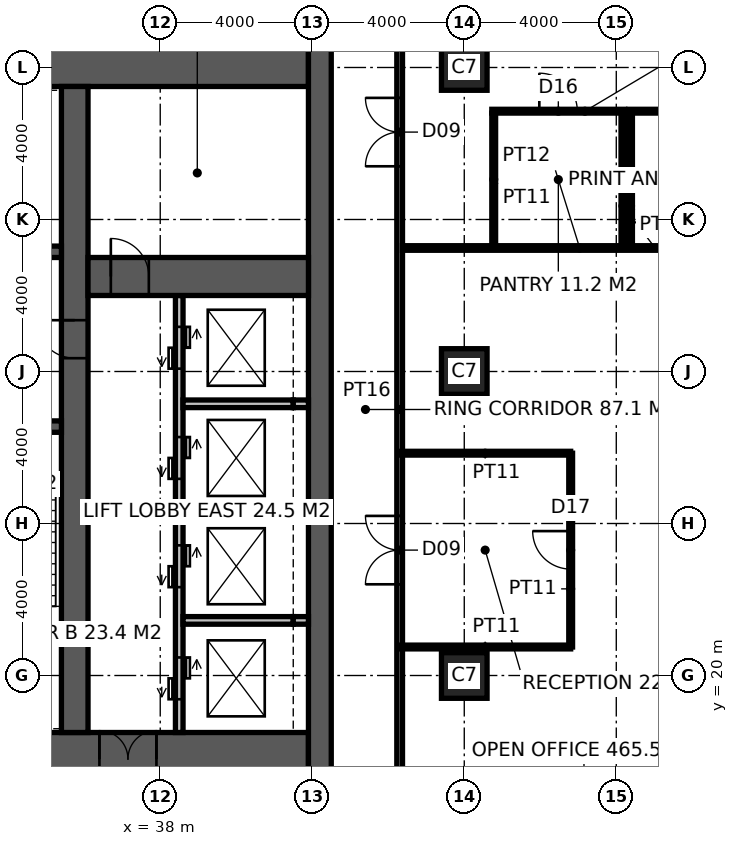
"""IFC4 building model, lengths in metres.
Left out: names, types, materials, properties, quantities, classifications, styles, units other than length and angle.
Written with IfcOpenShell. Run it as: python <this file> out.ifc"""

import sys

from ifc_helpers import new_model, si_unit, direction, frame, frame_2d, origin, origin_2d, place, context, subcontext, project, spatial, rectangle, hollow_rectangle, extrude, element, fill, save


model = new_model("IFC4")
c1 = context("Model", 3, precision=1e-05, world=origin(), true_north=direction((0.0, 1.0)))
c2 = subcontext(c1, "Body", "Model", "MODEL_VIEW")
j1 = project(units=[si_unit("LENGTHUNIT", "METRE"), si_unit("PLANEANGLEUNIT", "RADIAN")], contexts=[c1])
p1 = place(None, origin())
s1 = spatial("IfcSite", under=j1, at=p1, CompositionType="ELEMENT")
p2 = place(p1, origin())
s2 = spatial("IfcBuilding", under=s1, at=p2, CompositionType="ELEMENT")
p3 = place(p2, frame((0.0, 0.0, 51.0)))
s3 = spatial("IfcBuildingStorey", under=s2, at=p3, CompositionType="ELEMENT", Elevation=51.0)
for number, where, z_axis, x_axis in (
    (1, (46.0, 20.0, 0.0), (0.0, 0.0, 1.0), (1.0, 0.0, 0.0)),
    (2, (46.0, 28.0, 0.0), (0.0, 0.0, 1.0), (1.0, 0.0, 0.0)),
    (3, (46.0, 36.0, 0.0), (0.0, 0.0, 1.0), (1.0, 0.0, 0.0)),
):
    element("IfcColumn", number, at=place(p3, frame(where, z_axis=z_axis, x_axis=x_axis)), inside=s3, PredefinedType="COLUMN", context=c2, shape_type="SweptSolid", body=[
        extrude(hollow_rectangle(XDim=1.2, YDim=1.2, WallThickness=0.1, at=origin_2d()), origin(), (0.0, 0.0, 1.0), 4.0),
    ])
p4 = place(p3, frame((18.5, 17.8, -0.15), z_axis=(0.0, 0.0, 1.0), x_axis=(1.0, 0.0, 0.0)))
e4 = element("IfcWall", 4, at=p4, inside=s3, PredefinedType="SHEAR", context=c2, shape_type="SweptSolid", body=[
    extrude(rectangle(XDim=23.4, YDim=1.4, at=frame_2d((11.7, 0.0))), origin(), (0.0, 0.0, 1.0), 4.0),
])
p5 = place(p4, frame((3.45, 0.0, 0.15)))
e5 = element("IfcOpeningElement", 5, at=p5, cuts=e4, PredefinedType="OPENING", context=c2, shape_type="SweptSolid", body=[
    extrude(rectangle(XDim=1.5, YDim=2.4, at=frame_2d((0.75, 1.2))), frame((0.0, 0.71, 0.0), z_axis=(0.0, -1.0, 0.0), x_axis=(1.0, 0.0, 0.0)), (0.0, 0.0, 1.0), 1.42),
])
p6 = place(p4, frame((17.9, 0.0, 0.15)))
e6 = element("IfcOpeningElement", 6, at=p6, cuts=e4, PredefinedType="OPENING", context=c2, shape_type="SweptSolid", body=[
    extrude(rectangle(XDim=1.5, YDim=2.4, at=frame_2d((0.75, 1.2))), frame((0.0, 0.71, 0.0), z_axis=(0.0, -1.0, 0.0), x_axis=(1.0, 0.0, 0.0)), (0.0, 0.0, 1.0), 1.42),
])
p7 = place(p4, frame((0.9, 0.0, 0.15)))
e7 = element("IfcOpeningElement", 7, at=p7, cuts=e4, PredefinedType="OPENING", context=c2, shape_type="SweptSolid", body=[
    extrude(rectangle(XDim=1.0, YDim=2.2, at=frame_2d((0.5, 1.1))), frame((0.0, 0.71, 0.0), z_axis=(0.0, -1.0, 0.0), x_axis=(1.0, 0.0, 0.0)), (0.0, 0.0, 1.0), 1.42),
])
p8 = place(p3, frame((18.5, 36.2, -0.15), z_axis=(0.0, 0.0, 1.0), x_axis=(1.0, 0.0, 0.0)))
e8 = element("IfcWall", 8, at=p8, inside=s3, PredefinedType="SHEAR", context=c2, shape_type="SweptSolid", body=[
    extrude(rectangle(XDim=23.4, YDim=1.4, at=frame_2d((11.7, 0.0))), origin(), (0.0, 0.0, 1.0), 4.0),
])
p9 = place(p3, frame((42.2, 17.1, -0.15), z_axis=(0.0, 0.0, 1.0), x_axis=(0.0, 1.0, 0.0)))
e9 = element("IfcWall", 9, at=p9, inside=s3, PredefinedType="SHEAR", context=c2, shape_type="SweptSolid", body=[
    extrude(rectangle(XDim=19.8, YDim=0.6, at=frame_2d((9.9, 0.0))), origin(), (0.0, 0.0, 1.0), 4.0),
])
p10 = place(p3, frame((35.75, 18.5, -0.15), z_axis=(0.0, 0.0, 1.0), x_axis=(0.0, 1.0, 0.0)))
e10 = element("IfcWall", 10, at=p10, inside=s3, PredefinedType="SHEAR", context=c2, shape_type="SweptSolid", body=[
    extrude(rectangle(XDim=17.0, YDim=0.7, at=frame_2d((8.5, 0.0))), origin(), (0.0, 0.0, 1.0), 4.0),
])
p11 = place(p10, frame((9.85, 0.0, 0.15)))
e11 = element("IfcOpeningElement", 11, at=p11, cuts=e10, PredefinedType="OPENING", context=c2, shape_type="SweptSolid", body=[
    extrude(rectangle(XDim=1.0, YDim=2.2, at=frame_2d((0.5, 1.1))), frame((0.0, 0.36, 0.0), z_axis=(0.0, -1.0, 0.0), x_axis=(1.0, 0.0, 0.0)), (0.0, 0.0, 1.0), 0.72),
])
p12 = place(p3, frame((24.15, 26.55, -0.15), z_axis=(0.0, 0.0, 1.0), x_axis=(1.0, 0.0, 0.0)))
e12 = element("IfcWall", 12, at=p12, inside=s3, PredefinedType="SHEAR", context=c2, shape_type="SweptSolid", body=[
    extrude(rectangle(XDim=11.25, YDim=0.3, at=frame_2d((5.625, 0.0))), origin(), (0.0, 0.0, 1.0), 4.0),
])
p13 = place(p12, frame((9.25, 0.0, 0.15)))
e13 = element("IfcOpeningElement", 13, at=p13, cuts=e12, PredefinedType="OPENING", context=c2, shape_type="SweptSolid", body=[
    extrude(rectangle(XDim=1.0, YDim=2.2, at=frame_2d((0.5, 1.1))), frame((0.0, 0.16, 0.0), z_axis=(0.0, -1.0, 0.0), x_axis=(1.0, 0.0, 0.0)), (0.0, 0.0, 1.0), 0.32),
])
p14 = place(p12, frame((4.9, 0.0, 0.15)))
e14 = element("IfcOpeningElement", 14, at=p14, cuts=e12, PredefinedType="OPENING", context=c2, shape_type="SweptSolid", body=[
    extrude(rectangle(XDim=1.5, YDim=2.4, at=frame_2d((0.75, 1.2))), frame((0.0, 0.16, 0.0), z_axis=(0.0, -1.0, 0.0), x_axis=(1.0, 0.0, 0.0)), (0.0, 0.0, 1.0), 0.32),
])
p15 = place(p3, frame((24.15, 31.15, -0.15), z_axis=(0.0, 0.0, 1.0), x_axis=(1.0, 0.0, 0.0)))
e15 = element("IfcWall", 15, at=p15, inside=s3, PredefinedType="SHEAR", context=c2, shape_type="SweptSolid", body=[
    extrude(rectangle(XDim=11.25, YDim=0.3, at=frame_2d((5.625, 0.0))), origin(), (0.0, 0.0, 1.0), 4.0),
])
p16 = place(p15, frame((7.25, 0.0, 0.15)))
e16 = element("IfcOpeningElement", 16, at=p16, cuts=e15, PredefinedType="OPENING", context=c2, shape_type="SweptSolid", body=[
    extrude(rectangle(XDim=1.4, YDim=2.4, at=frame_2d((0.7, 1.2))), frame((0.0, 0.16, 0.0), z_axis=(0.0, -1.0, 0.0), x_axis=(1.0, 0.0, 0.0)), (0.0, 0.0, 1.0), 0.32),
])
p17 = place(p3, frame((38.5, 18.5, -0.15), z_axis=(0.0, 0.0, 1.0), x_axis=(0.0, 1.0, 0.0)))
e17 = element("IfcWall", 17, at=p17, inside=s3, PredefinedType="SOLIDWALL", context=c2, shape_type="SweptSolid", body=[
    extrude(rectangle(XDim=11.5, YDim=0.2, at=frame_2d((5.75, 0.0))), origin(), (0.0, 0.0, 1.0), 4.0),
])
p18 = place(p17, frame((0.875, 0.0, 0.15)))
e18 = element("IfcOpeningElement", 18, at=p18, cuts=e17, PredefinedType="OPENING", context=c2, shape_type="SweptSolid", body=[
    extrude(rectangle(XDim=1.1, YDim=2.2, at=frame_2d((0.55, 1.1))), frame((0.0, 0.11, 0.0), z_axis=(0.0, -1.0, 0.0), x_axis=(1.0, 0.0, 0.0)), (0.0, 0.0, 1.0), 0.22),
])
p19 = place(p17, frame((3.825, 0.0, 0.15)))
e19 = element("IfcOpeningElement", 19, at=p19, cuts=e17, PredefinedType="OPENING", context=c2, shape_type="SweptSolid", body=[
    extrude(rectangle(XDim=1.1, YDim=2.2, at=frame_2d((0.55, 1.1))), frame((0.0, 0.11, 0.0), z_axis=(0.0, -1.0, 0.0), x_axis=(1.0, 0.0, 0.0)), (0.0, 0.0, 1.0), 0.22),
])
p20 = place(p17, frame((6.675, 0.0, 0.15)))
e20 = element("IfcOpeningElement", 20, at=p20, cuts=e17, PredefinedType="OPENING", context=c2, shape_type="SweptSolid", body=[
    extrude(rectangle(XDim=1.1, YDim=2.2, at=frame_2d((0.55, 1.1))), frame((0.0, 0.11, 0.0), z_axis=(0.0, -1.0, 0.0), x_axis=(1.0, 0.0, 0.0)), (0.0, 0.0, 1.0), 0.22),
])
p21 = place(p17, frame((9.575, 0.0, 0.15)))
e21 = element("IfcOpeningElement", 21, at=p21, cuts=e17, PredefinedType="OPENING", context=c2, shape_type="SweptSolid", body=[
    extrude(rectangle(XDim=1.1, YDim=2.2, at=frame_2d((0.55, 1.1))), frame((0.0, 0.11, 0.0), z_axis=(0.0, -1.0, 0.0), x_axis=(1.0, 0.0, 0.0)), (0.0, 0.0, 1.0), 0.22),
])
p22 = place(p3, frame((36.1, 30.5, -0.15), z_axis=(0.0, 0.0, 1.0), x_axis=(1.0, 0.0, 0.0)))
e22 = element("IfcWall", 22, at=p22, inside=s3, PredefinedType="SHEAR", context=c2, shape_type="SweptSolid", body=[
    extrude(rectangle(XDim=5.8, YDim=1.0, at=frame_2d((2.9, 0.0))), origin(), (0.0, 0.0, 1.0), 4.0),
])
p23 = place(p22, frame((0.6, 0.0, 0.15)))
e23 = element("IfcOpeningElement", 23, at=p23, cuts=e22, PredefinedType="OPENING", context=c2, shape_type="SweptSolid", body=[
    extrude(rectangle(XDim=1.0, YDim=2.2, at=frame_2d((0.5, 1.1))), frame((0.0, 0.51, 0.0), z_axis=(0.0, -1.0, 0.0), x_axis=(1.0, 0.0, 0.0)), (0.0, 0.0, 1.0), 1.02),
])
p24 = place(p3, frame((38.6, 21.45, -0.15), z_axis=(0.0, 0.0, 1.0), x_axis=(1.0, 0.0, 0.0)))
e24 = element("IfcWall", 24, at=p24, inside=s3, PredefinedType="SOLIDWALL", context=c2, shape_type="SweptSolid", body=[
    extrude(rectangle(XDim=2.9, YDim=0.2, at=frame_2d((1.45, 0.0))), origin(), (0.0, 0.0, 1.0), 4.0),
])
p25 = place(p3, frame((41.5, 21.45, -0.15), z_axis=(0.0, 0.0, 1.0), x_axis=(1.0, 0.0, 0.0)))
e25 = element("IfcWall", 25, at=p25, inside=s3, PredefinedType="SOLIDWALL", context=c2, shape_type="SweptSolid", body=[
    extrude(rectangle(XDim=0.4, YDim=0.2, at=frame_2d((0.2, 0.0))), origin(), (0.0, 0.0, 1.0), 4.0),
])
p26 = place(p3, frame((38.6, 24.3, -0.15), z_axis=(0.0, 0.0, 1.0), x_axis=(1.0, 0.0, 0.0)))
e26 = element("IfcWall", 26, at=p26, inside=s3, PredefinedType="SOLIDWALL", context=c2, shape_type="SweptSolid", body=[
    extrude(rectangle(XDim=2.9, YDim=0.2, at=frame_2d((1.45, 0.0))), origin(), (0.0, 0.0, 1.0), 4.0),
])
p27 = place(p3, frame((41.5, 24.3, -0.15), z_axis=(0.0, 0.0, 1.0), x_axis=(1.0, 0.0, 0.0)))
e27 = element("IfcWall", 27, at=p27, inside=s3, PredefinedType="SOLIDWALL", context=c2, shape_type="SweptSolid", body=[
    extrude(rectangle(XDim=0.4, YDim=0.2, at=frame_2d((0.2, 0.0))), origin(), (0.0, 0.0, 1.0), 4.0),
])
p28 = place(p3, frame((38.6, 27.15, -0.15), z_axis=(0.0, 0.0, 1.0), x_axis=(1.0, 0.0, 0.0)))
e28 = element("IfcWall", 28, at=p28, inside=s3, PredefinedType="SOLIDWALL", context=c2, shape_type="SweptSolid", body=[
    extrude(rectangle(XDim=2.9, YDim=0.2, at=frame_2d((1.45, 0.0))), origin(), (0.0, 0.0, 1.0), 4.0),
])
p29 = place(p3, frame((41.5, 27.15, -0.15), z_axis=(0.0, 0.0, 1.0), x_axis=(1.0, 0.0, 0.0)))
e29 = element("IfcWall", 29, at=p29, inside=s3, PredefinedType="SOLIDWALL", context=c2, shape_type="SweptSolid", body=[
    extrude(rectangle(XDim=0.4, YDim=0.2, at=frame_2d((0.2, 0.0))), origin(), (0.0, 0.0, 1.0), 4.0),
])
p30 = place(p3, frame((44.3, 15.225, 0.0), z_axis=(0.0, 0.0, 1.0), x_axis=(0.0, 1.0, 0.0)))
e30 = element("IfcWall", 30, at=p30, inside=s3, PredefinedType="PARTITIONING", context=c2, shape_type="SweptSolid", body=[
    extrude(rectangle(XDim=23.55, YDim=0.15, at=frame_2d((11.775, 0.0))), origin(), (0.0, 0.0, 1.0), 3.85),
])
p31 = place(p30, frame((7.175, 0.0, 0.0)))
e31 = element("IfcOpeningElement", 31, at=p31, cuts=e30, PredefinedType="OPENING", context=c2, shape_type="SweptSolid", body=[
    extrude(rectangle(XDim=1.8, YDim=2.4, at=frame_2d((0.9, 1.2))), frame((0.0, 0.085, 0.0), z_axis=(0.0, -1.0, 0.0), x_axis=(1.0, 0.0, 0.0)), (0.0, 0.0, 1.0), 0.17),
])
p32 = place(p30, frame((18.175, 0.0, 0.0)))
e32 = element("IfcOpeningElement", 32, at=p32, cuts=e30, PredefinedType="OPENING", context=c2, shape_type="SweptSolid", body=[
    extrude(rectangle(XDim=1.8, YDim=2.4, at=frame_2d((0.9, 1.2))), frame((0.0, 0.085, 0.0), z_axis=(0.0, -1.0, 0.0), x_axis=(1.0, 0.0, 0.0)), (0.0, 0.0, 1.0), 0.17),
])
p33 = place(p3, frame((44.375, 31.25, 0.0), z_axis=(0.0, 0.0, 1.0), x_axis=(1.0, 0.0, 0.0)))
e33 = element("IfcWall", 33, at=p33, inside=s3, PredefinedType="PARTITIONING", context=c2, shape_type="SweptSolid", body=[
    extrude(rectangle(XDim=9.325, YDim=0.12, at=frame_2d((4.663, 0.0))), origin(), (0.0, 0.0, 1.0), 3.85),
])
p34 = place(p3, frame((46.725, 34.85, 0.0), z_axis=(0.0, 0.0, 1.0), x_axis=(1.0, 0.0, 0.0)))
e34 = element("IfcWall", 34, at=p34, inside=s3, PredefinedType="PARTITIONING", context=c2, shape_type="SweptSolid", body=[
    extrude(rectangle(XDim=3.5, YDim=0.1, at=frame_2d((1.75, 0.0))), origin(), (0.0, 0.0, 1.0), 3.85),
])
p35 = place(p34, frame((1.25, 0.0, 0.0)))
e35 = element("IfcOpeningElement", 35, at=p35, cuts=e34, PredefinedType="OPENING", context=c2, shape_type="SweptSolid", body=[
    extrude(rectangle(XDim=1.0, YDim=2.2, at=frame_2d((0.5, 1.1))), frame((0.0, 0.06, 0.0), z_axis=(0.0, -1.0, 0.0), x_axis=(1.0, 0.0, 0.0)), (0.0, 0.0, 1.0), 0.12),
])
p36 = place(p3, frame((50.325, 34.85, 0.0), z_axis=(0.0, 0.0, 1.0), x_axis=(1.0, 0.0, 0.0)))
e36 = element("IfcWall", 36, at=p36, inside=s3, PredefinedType="PARTITIONING", context=c2, shape_type="SweptSolid", body=[
    extrude(rectangle(XDim=2.75, YDim=0.1, at=frame_2d((1.375, 0.0))), origin(), (0.0, 0.0, 1.0), 3.85),
])
p37 = place(p36, frame((0.875, 0.0, 0.0)))
e37 = element("IfcOpeningElement", 37, at=p37, cuts=e36, PredefinedType="OPENING", context=c2, shape_type="SweptSolid", body=[
    extrude(rectangle(XDim=1.0, YDim=2.2, at=frame_2d((0.5, 1.1))), frame((0.0, 0.06, 0.0), z_axis=(0.0, -1.0, 0.0), x_axis=(1.0, 0.0, 0.0)), (0.0, 0.0, 1.0), 0.12),
])
for number, where, z_axis, x_axis in (
    (38, (46.775, 31.31, 0.0), (0.0, 0.0, 1.0), (0.0, 1.0, 0.0)),
    (39, (50.175, 31.31, 0.0), (0.0, 0.0, 1.0), (0.0, 1.0, 0.0)),
    (40, (50.375, 31.31, 0.0), (0.0, 0.0, 1.0), (0.0, 1.0, 0.0)),
):
    element("IfcWall", number, at=place(p3, frame(where, z_axis=z_axis, x_axis=x_axis)), inside=s3, PredefinedType="PARTITIONING", context=c2, shape_type="SweptSolid", body=[
        extrude(rectangle(XDim=3.49, YDim=0.1, at=frame_2d((1.745, 0.0))), origin(), (0.0, 0.0, 1.0), 3.85),
    ])
p38 = place(p3, frame((44.3, 20.75, 0.0), z_axis=(0.0, 0.0, 1.0), x_axis=(1.0, 0.0, 0.0)))
e41 = element("IfcWall", 41, at=p38, inside=s3, PredefinedType="PARTITIONING", context=c2, shape_type="SweptSolid", body=[
    extrude(rectangle(XDim=4.5, YDim=0.1, at=frame_2d((2.25, 0.0))), origin(), (0.0, 0.0, 1.0), 3.85),
])
p39 = place(p3, frame((48.8, 20.75, 0.0), z_axis=(0.0, 0.0, 1.0), x_axis=(0.0, 1.0, 0.0)))
e42 = element("IfcWall", 42, at=p39, inside=s3, PredefinedType="PARTITIONING", context=c2, shape_type="SweptSolid", body=[
    extrude(rectangle(XDim=5.1, YDim=0.1, at=frame_2d((2.55, 0.0))), origin(), (0.0, 0.0, 1.0), 3.85),
])
p40 = place(p39, frame((2.05, 0.0, 0.0)))
e43 = element("IfcOpeningElement", 43, at=p40, cuts=e42, PredefinedType="OPENING", context=c2, shape_type="SweptSolid", body=[
    extrude(rectangle(XDim=1.0, YDim=2.2, at=frame_2d((0.5, 1.1))), frame((0.0, 0.06, 0.0), z_axis=(0.0, -1.0, 0.0), x_axis=(1.0, 0.0, 0.0)), (0.0, 0.0, 1.0), 0.12),
])
p41 = place(p3, frame((48.8, 25.85, 0.0), z_axis=(0.0, 0.0, 1.0), x_axis=(-1.0, 0.0, 0.0)))
e44 = element("IfcWall", 44, at=p41, inside=s3, PredefinedType="PARTITIONING", context=c2, shape_type="SweptSolid", body=[
    extrude(rectangle(XDim=4.5, YDim=0.1, at=frame_2d((2.25, 0.0))), origin(), (0.0, 0.0, 1.0), 3.85),
])
p42 = place(p11, origin())
e45 = element("IfcDoor", 45, at=p42, inside=s3, OperationType="SINGLE_SWING_RIGHT", PredefinedType="DOOR", context=c2, shape_type="SweptSolid", body=[
    extrude(rectangle(XDim=1.0, YDim=2.2, at=frame_2d((0.5, 1.1))), frame((0.0, 0.025, 0.0), z_axis=(0.0, -1.0, 0.0), x_axis=(1.0, 0.0, 0.0)), (0.0, 0.0, 1.0), 0.05),
])
fill(e11, e45)
p43 = place(p6, origin())
e46 = element("IfcDoor", 46, at=p43, inside=s3, OperationType="DOUBLE_DOOR_DOUBLE_SWING", PredefinedType="DOOR", context=c2, shape_type="SweptSolid", body=[
    extrude(rectangle(XDim=1.5, YDim=2.4, at=frame_2d((0.75, 1.2))), frame((0.0, 0.025, 0.0), z_axis=(0.0, -1.0, 0.0), x_axis=(1.0, 0.0, 0.0)), (0.0, 0.0, 1.0), 0.05),
])
fill(e6, e46)
p44 = place(p23, origin())
e47 = element("IfcDoor", 47, at=p44, inside=s3, OperationType="SINGLE_SWING_LEFT", PredefinedType="DOOR", context=c2, shape_type="SweptSolid", body=[
    extrude(rectangle(XDim=1.0, YDim=2.2, at=frame_2d((0.5, 1.1))), frame((0.0, 0.025, 0.0), z_axis=(0.0, -1.0, 0.0), x_axis=(1.0, 0.0, 0.0)), (0.0, 0.0, 1.0), 0.05),
])
fill(e23, e47)
p45 = place(p31, origin())
e48 = element("IfcDoor", 48, at=p45, inside=s3, OperationType="DOUBLE_DOOR_DOUBLE_SWING", PredefinedType="DOOR", context=c2, shape_type="SweptSolid", body=[
    extrude(rectangle(XDim=1.8, YDim=2.4, at=frame_2d((0.9, 1.2))), frame((0.0, 0.025, 0.0), z_axis=(0.0, -1.0, 0.0), x_axis=(1.0, 0.0, 0.0)), (0.0, 0.0, 1.0), 0.05),
])
fill(e31, e48)
p46 = place(p32, origin())
e49 = element("IfcDoor", 49, at=p46, inside=s3, OperationType="DOUBLE_DOOR_DOUBLE_SWING", PredefinedType="DOOR", context=c2, shape_type="SweptSolid", body=[
    extrude(rectangle(XDim=1.8, YDim=2.4, at=frame_2d((0.9, 1.2))), frame((0.0, 0.025, 0.0), z_axis=(0.0, -1.0, 0.0), x_axis=(1.0, 0.0, 0.0)), (0.0, 0.0, 1.0), 0.05),
])
fill(e32, e49)
p47 = place(p35, origin())
e50 = element("IfcDoor", 50, at=p47, inside=s3, OperationType="SINGLE_SWING_LEFT", PredefinedType="DOOR", context=c2, shape_type="SweptSolid", body=[
    extrude(rectangle(XDim=1.0, YDim=2.2, at=frame_2d((0.5, 1.1))), frame((0.0, 0.025, 0.0), z_axis=(0.0, -1.0, 0.0), x_axis=(1.0, 0.0, 0.0)), (0.0, 0.0, 1.0), 0.05),
])
fill(e35, e50)
p48 = place(p40, origin())
e51 = element("IfcDoor", 51, at=p48, inside=s3, OperationType="SINGLE_SWING_RIGHT", PredefinedType="DOOR", context=c2, shape_type="SweptSolid", body=[
    extrude(rectangle(XDim=1.0, YDim=2.2, at=frame_2d((0.5, 1.1))), frame((0.0, 0.025, 0.0), z_axis=(0.0, -1.0, 0.0), x_axis=(1.0, 0.0, 0.0)), (0.0, 0.0, 1.0), 0.05),
])
fill(e43, e51)
p49 = place(p18, origin())
e52 = element("IfcDoor", 52, at=p49, inside=s3, OperationType="DOUBLE_DOOR_SLIDING", PredefinedType="DOOR", context=c2, shape_type="SweptSolid", body=[
    extrude(rectangle(XDim=1.1, YDim=2.2, at=frame_2d((0.55, 1.1))), frame((0.0, 0.025, 0.0), z_axis=(0.0, -1.0, 0.0), x_axis=(1.0, 0.0, 0.0)), (0.0, 0.0, 1.0), 0.05),
])
fill(e18, e52)
p50 = place(p19, origin())
e53 = element("IfcDoor", 53, at=p50, inside=s3, OperationType="DOUBLE_DOOR_SLIDING", PredefinedType="DOOR", context=c2, shape_type="SweptSolid", body=[
    extrude(rectangle(XDim=1.1, YDim=2.2, at=frame_2d((0.55, 1.1))), frame((0.0, 0.025, 0.0), z_axis=(0.0, -1.0, 0.0), x_axis=(1.0, 0.0, 0.0)), (0.0, 0.0, 1.0), 0.05),
])
fill(e19, e53)
p51 = place(p20, origin())
e54 = element("IfcDoor", 54, at=p51, inside=s3, OperationType="DOUBLE_DOOR_SLIDING", PredefinedType="DOOR", context=c2, shape_type="SweptSolid", body=[
    extrude(rectangle(XDim=1.1, YDim=2.2, at=frame_2d((0.55, 1.1))), frame((0.0, 0.025, 0.0), z_axis=(0.0, -1.0, 0.0), x_axis=(1.0, 0.0, 0.0)), (0.0, 0.0, 1.0), 0.05),
])
fill(e20, e54)
p52 = place(p21, origin())
e55 = element("IfcDoor", 55, at=p52, inside=s3, OperationType="DOUBLE_DOOR_SLIDING", PredefinedType="DOOR", context=c2, shape_type="SweptSolid", body=[
    extrude(rectangle(XDim=1.1, YDim=2.2, at=frame_2d((0.55, 1.1))), frame((0.0, 0.025, 0.0), z_axis=(0.0, -1.0, 0.0), x_axis=(1.0, 0.0, 0.0)), (0.0, 0.0, 1.0), 0.05),
])
fill(e21, e55)
save(model, sys.argv[1])
